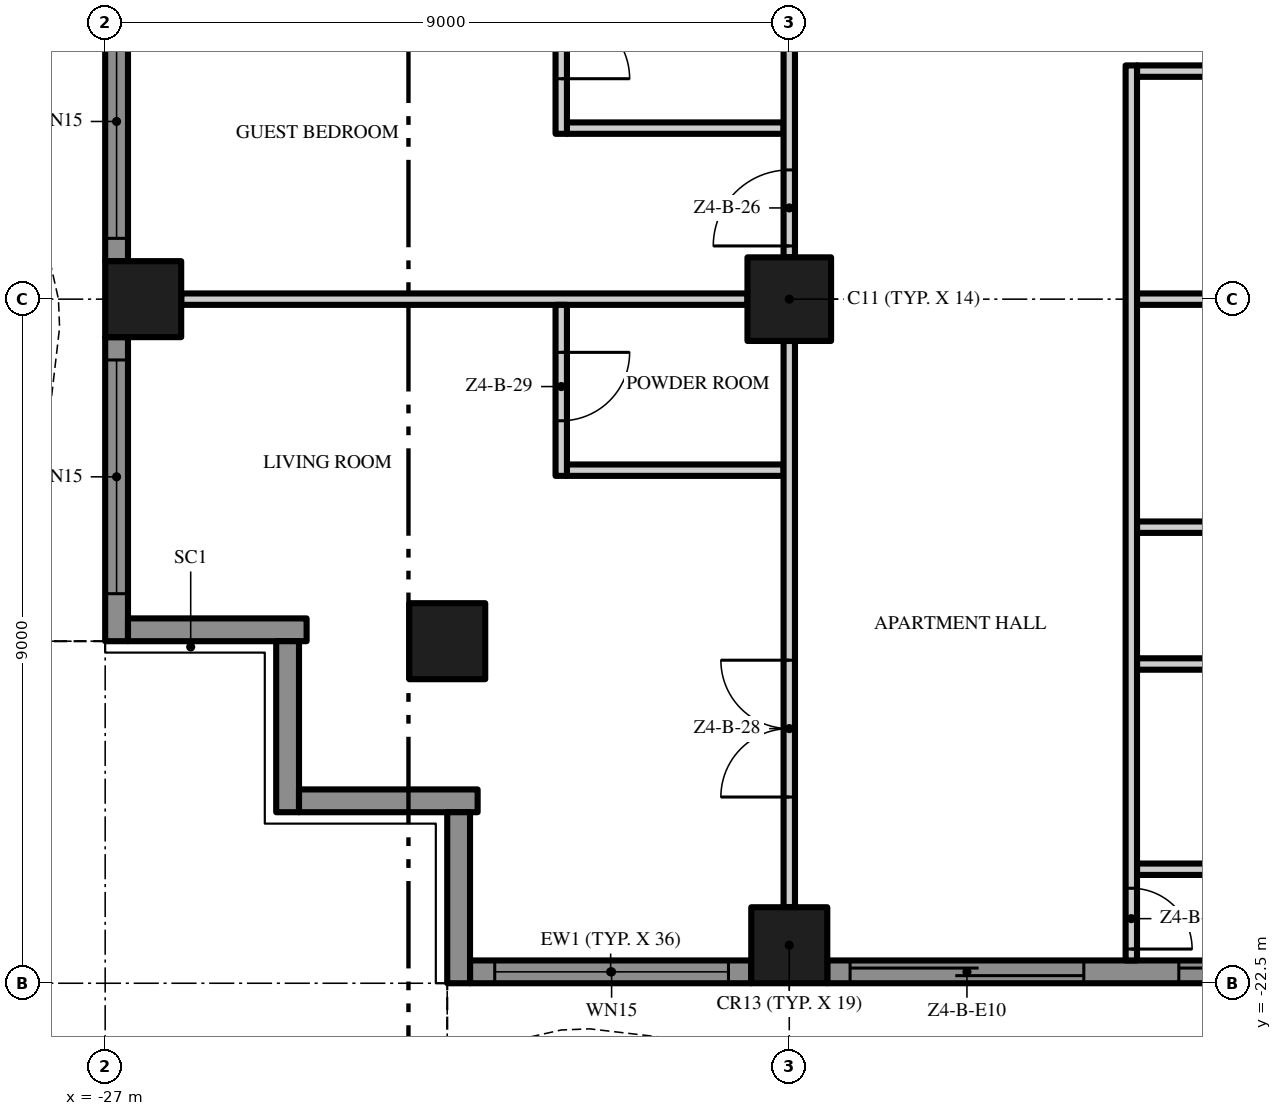
"""IFC4 building model, lengths in metres.
Left out: names, types, materials, properties, quantities, classifications, styles, units other than length and angle.
Written with IfcOpenShell. Run it as: python <this file> out.ifc"""

import sys

from ifc_helpers import new_model, si_unit, direction, frame, frame_2d, origin, origin_2d, place, context, subcontext, project, spatial, polyline, rectangle, outline, extrude, element, fill, save


model = new_model("IFC4")
c1 = context("Model", 3, precision=1e-05, world=origin(), true_north=direction((0.0, 1.0)))
c2 = subcontext(c1, "Body", "Model", "MODEL_VIEW")
j1 = project(units=[si_unit("LENGTHUNIT", "METRE"), si_unit("PLANEANGLEUNIT", "RADIAN")], contexts=[c1])
p1 = place(None, origin())
s1 = spatial("IfcSite", under=j1, at=p1, CompositionType="ELEMENT")
p2 = place(p1, origin())
s2 = spatial("IfcBuilding", under=s1, at=p2, CompositionType="ELEMENT")
p3 = place(p2, frame((0.0, 0.0, 199.6)))
s3 = spatial("IfcBuildingStorey", under=s2, at=p3, CompositionType="ELEMENT", Elevation=199.6)
p4 = place(p3, frame((-18.0, -13.5, 0.0), z_axis=(0.0, 0.0, 1.0), x_axis=(1.0, 0.0, 0.0)))
e1 = element("IfcColumn", 1, at=p4, inside=s3, PredefinedType="COLUMN", context=c2, shape_type="SweptSolid", body=[
    extrude(rectangle(XDim=1.1, YDim=1.1, at=origin_2d()), origin(), (0.0, 0.0, 1.0), 3.5),
])
for number, where, z_axis, x_axis in (
    (2, (-18.0, -22.0, 0.0), (0.0, 0.0, 1.0), (1.0, 0.0, 0.0)),
    (3, (-26.5, -13.5, 0.0), (0.0, 0.0, 1.0), (1.0, 0.0, 0.0)),
    (4, (-22.5, -18.0, 0.0), (0.0, 0.0, 1.0), (1.0, 0.0, 0.0)),
):
    element("IfcColumn", number, at=place(p3, frame(where, z_axis=z_axis, x_axis=x_axis)), inside=s3, PredefinedType="COLUMN", context=c2, shape_type="SweptSolid", body=[
        extrude(rectangle(XDim=1.0, YDim=1.0, at=origin_2d()), origin(), (0.0, 0.0, 1.0), 3.5),
    ])
p5 = place(p3, frame((-18.5, -22.35, 0.0), z_axis=(0.0, 0.0, 1.0), x_axis=(-1.0, 0.0, 0.0)))
e5 = element("IfcWall", 5, at=p5, inside=s3, PredefinedType="SOLIDWALL", context=c2, shape_type="SweptSolid", body=[
    extrude(rectangle(XDim=3.7, YDim=0.3, at=frame_2d((1.85, 0.0))), origin(), (0.0, 0.0, 1.0), 3.5),
])
p6 = place(p5, frame((0.3, 0.0, 0.45)))
e6 = element("IfcOpeningElement", 6, at=p6, cuts=e5, PredefinedType="OPENING", context=c2, shape_type="SweptSolid", body=[
    extrude(rectangle(XDim=3.075, YDim=2.65, at=frame_2d((1.538, 1.325))), frame((0.0, 0.16, 0.0), z_axis=(0.0, -1.0, 0.0), x_axis=(1.0, 0.0, 0.0)), (0.0, 0.0, 1.0), 0.32),
])
p7 = place(p3, frame((-9.5, -22.35, 0.0), z_axis=(0.0, 0.0, 1.0), x_axis=(-1.0, 0.0, 0.0)))
e7 = element("IfcWall", 7, at=p7, inside=s3, PredefinedType="SOLIDWALL", context=c2, shape_type="SweptSolid", body=[
    extrude(rectangle(XDim=8.0, YDim=0.3, at=frame_2d((4.0, 0.0))), origin(), (0.0, 0.0, 1.0), 3.5),
])
p8 = place(p7, frame((4.625, 0.0, 0.0)))
e8 = element("IfcOpeningElement", 8, at=p8, cuts=e7, PredefinedType="OPENING", context=c2, shape_type="SweptSolid", body=[
    extrude(rectangle(XDim=3.075, YDim=2.4, at=frame_2d((1.538, 1.2))), frame((0.0, 0.16, 0.0), z_axis=(0.0, -1.0, 0.0), x_axis=(1.0, 0.0, 0.0)), (0.0, 0.0, 1.0), 0.32),
])
p9 = place(p7, frame((0.3, 0.0, 0.0)))
e9 = element("IfcOpeningElement", 9, at=p9, cuts=e7, PredefinedType="OPENING", context=c2, shape_type="SweptSolid", body=[
    extrude(rectangle(XDim=3.075, YDim=2.4, at=frame_2d((1.538, 1.2))), frame((0.0, 0.16, 0.0), z_axis=(0.0, -1.0, 0.0), x_axis=(1.0, 0.0, 0.0)), (0.0, 0.0, 1.0), 0.32),
])
p10 = place(p3, frame((-26.85, -13.0, 0.0), z_axis=(0.0, 0.0, 1.0), x_axis=(0.0, 1.0, 0.0)))
e10 = element("IfcWall", 10, at=p10, inside=s3, PredefinedType="SOLIDWALL", context=c2, shape_type="SweptSolid", body=[
    extrude(rectangle(XDim=8.0, YDim=0.3, at=frame_2d((4.0, 0.0))), origin(), (0.0, 0.0, 1.0), 3.5),
])
p11 = place(p10, frame((4.625, 0.0, 0.0)))
e11 = element("IfcOpeningElement", 11, at=p11, cuts=e10, PredefinedType="OPENING", context=c2, shape_type="SweptSolid", body=[
    extrude(rectangle(XDim=3.075, YDim=2.4, at=frame_2d((1.538, 1.2))), frame((0.0, 0.16, 0.0), z_axis=(0.0, -1.0, 0.0), x_axis=(1.0, 0.0, 0.0)), (0.0, 0.0, 1.0), 0.32),
])
p12 = place(p10, frame((0.3, 0.0, 0.45)))
e12 = element("IfcOpeningElement", 12, at=p12, cuts=e10, PredefinedType="OPENING", context=c2, shape_type="SweptSolid", body=[
    extrude(rectangle(XDim=3.075, YDim=2.65, at=frame_2d((1.538, 1.325))), frame((0.0, 0.16, 0.0), z_axis=(0.0, -1.0, 0.0), x_axis=(1.0, 0.0, 0.0)), (0.0, 0.0, 1.0), 0.32),
])
p13 = place(p3, frame((-26.85, -18.0, 0.0), z_axis=(0.0, 0.0, 1.0), x_axis=(0.0, 1.0, 0.0)))
e13 = element("IfcWall", 13, at=p13, inside=s3, PredefinedType="SOLIDWALL", context=c2, shape_type="SweptSolid", body=[
    extrude(rectangle(XDim=4.0, YDim=0.3, at=frame_2d((2.0, 0.0))), origin(), (0.0, 0.0, 1.0), 3.5),
])
p14 = place(p13, frame((0.625, 0.0, 0.45)))
e14 = element("IfcOpeningElement", 14, at=p14, cuts=e13, PredefinedType="OPENING", context=c2, shape_type="SweptSolid", body=[
    extrude(rectangle(XDim=3.075, YDim=2.65, at=frame_2d((1.538, 1.325))), frame((0.0, 0.16, 0.0), z_axis=(0.0, -1.0, 0.0), x_axis=(1.0, 0.0, 0.0)), (0.0, 0.0, 1.0), 0.32),
])
p15 = place(p3, frame((-24.35, -17.85, 0.0), z_axis=(0.0, 0.0, 1.0), x_axis=(-1.0, 0.0, 0.0)))
e15 = element("IfcWall", 15, at=p15, inside=s3, PredefinedType="SOLIDWALL", context=c2, shape_type="SweptSolid", body=[
    extrude(rectangle(XDim=2.35, YDim=0.3, at=frame_2d((1.175, 0.0))), origin(), (0.0, 0.0, 1.0), 3.5),
])
p16 = place(p3, frame((-24.6, -20.25, 0.0), z_axis=(0.0, 0.0, 1.0), x_axis=(0.0, 1.0, 0.0)))
e16 = element("IfcWall", 16, at=p16, inside=s3, PredefinedType="SOLIDWALL", context=c2, shape_type="SweptSolid", body=[
    extrude(rectangle(XDim=2.25, YDim=0.3, at=frame_2d((1.125, 0.0))), origin(), (0.0, 0.0, 1.0), 3.5),
])
p17 = place(p3, frame((-22.1, -20.1, 0.0), z_axis=(0.0, 0.0, 1.0), x_axis=(-1.0, 0.0, 0.0)))
e17 = element("IfcWall", 17, at=p17, inside=s3, PredefinedType="SOLIDWALL", context=c2, shape_type="SweptSolid", body=[
    extrude(rectangle(XDim=2.35, YDim=0.3, at=frame_2d((1.175, 0.0))), origin(), (0.0, 0.0, 1.0), 3.5),
])
p18 = place(p3, frame((-22.35, -22.5, 0.0), z_axis=(0.0, 0.0, 1.0), x_axis=(0.0, 1.0, 0.0)))
e18 = element("IfcWall", 18, at=p18, inside=s3, PredefinedType="SOLIDWALL", context=c2, shape_type="SweptSolid", body=[
    extrude(rectangle(XDim=2.25, YDim=0.3, at=frame_2d((1.125, 0.0))), origin(), (0.0, 0.0, 1.0), 3.5),
])
p19 = place(p3, origin())
e19 = element("IfcWall", 19, at=p19, inside=s3, PredefinedType="USERDEFINED", context=c2, shape_type="SweptSolid", body=[
    extrude(outline(polyline([(-22.5, -23.451), (-21.0, -23.115), (-20.625, -23.1), (-19.5, -23.231), (-18.0, -23.755), (-16.5, -24.488), (-15.0, -25.149), (-13.5, -25.485), (-13.125, -25.5), (-12.0, -25.369), (-10.5, -24.845), (-9.0, -24.112), (-7.5, -23.451), (-6.0, -23.115), (-5.625, -23.1), (-4.5, -23.231), (-3.0, -23.755), (-1.5, -24.488), (0.0, -25.149), (1.5, -25.485), (1.875, -25.5), (3.0, -25.369), (4.5, -24.845), (6.0, -24.112), (7.5, -23.451), (9.0, -23.115), (9.375, -23.1), (10.5, -23.231), (12.0, -23.755), (13.5, -24.488), (15.0, -25.149), (16.5, -25.485), (16.875, -25.5), (18.0, -25.369), (19.5, -24.845), (21.0, -24.112), (22.5, -23.451), (22.399, -23.223), (20.895, -23.885), (19.404, -24.614), (17.944, -25.124), (16.865, -25.249), (16.533, -25.236), (15.079, -24.91), (13.605, -24.261), (12.096, -23.524), (10.556, -22.986), (9.385, -22.849), (8.967, -22.866), (7.421, -23.213), (5.895, -23.885), (4.404, -24.614), (2.944, -25.124), (1.865, -25.249), (1.533, -25.236), (0.079, -24.91), (-1.395, -24.261), (-2.904, -23.524), (-4.444, -22.986), (-5.615, -22.849), (-6.033, -22.866), (-7.579, -23.213), (-9.105, -23.885), (-10.596, -24.614), (-12.056, -25.124), (-13.135, -25.249), (-13.467, -25.236), (-14.921, -24.91), (-16.395, -24.261), (-17.904, -23.524), (-19.444, -22.986), (-20.615, -22.849), (-21.033, -22.866), (-22.555, -23.208), (-22.5, -23.451)])), origin(), (0.0, 0.0, 1.0), 0.9),
])
p20 = place(p3, origin())
e20 = element("IfcWall", 20, at=p20, inside=s3, PredefinedType="USERDEFINED", context=c2, shape_type="SweptSolid", body=[
    extrude(outline(polyline([(-27.951, 18.0), (-27.615, 16.5), (-27.6, 16.125), (-27.731, 15.0), (-28.255, 13.5), (-28.988, 12.0), (-29.649, 10.5), (-29.985, 9.0), (-30.0, 8.625), (-29.869, 7.5), (-29.345, 6.0), (-28.612, 4.5), (-27.951, 3.0), (-27.615, 1.5), (-27.6, 1.125), (-27.731, 0.0), (-28.255, -1.5), (-28.988, -3.0), (-29.649, -4.5), (-29.985, -6.0), (-30.0, -6.375), (-29.869, -7.5), (-29.345, -9.0), (-28.612, -10.5), (-27.951, -12.0), (-27.615, -13.5), (-27.6, -13.875), (-27.731, -15.0), (-28.255, -16.5), (-28.988, -18.0), (-28.763, -18.11), (-28.024, -16.596), (-27.486, -15.056), (-27.349, -13.885), (-27.366, -13.467), (-27.713, -11.921), (-28.385, -10.395), (-29.114, -8.904), (-29.624, -7.444), (-29.749, -6.365), (-29.736, -6.033), (-29.41, -4.579), (-28.761, -3.105), (-28.024, -1.596), (-27.486, -0.056), (-27.349, 1.115), (-27.366, 1.533), (-27.713, 3.079), (-28.385, 4.605), (-29.114, 6.096), (-29.624, 7.556), (-29.749, 8.635), (-29.736, 8.967), (-29.41, 10.421), (-28.761, 11.895), (-28.024, 13.404), (-27.486, 14.944), (-27.349, 16.115), (-27.366, 16.533), (-27.708, 18.055), (-27.951, 18.0)])), origin(), (0.0, 0.0, 1.0), 0.9),
])
for number, where, z_axis, x_axis in (
    (21, (-13.425, -21.0, 0.0), (0.0, 0.0, 1.0), (1.0, 0.0, 0.0)),
    (22, (-13.425, -18.3, 0.0), (0.0, 0.0, 1.0), (1.0, 0.0, 0.0)),
    (23, (-13.425, -16.5, 0.0), (0.0, 0.0, 1.0), (1.0, 0.0, 0.0)),
):
    element("IfcWall", number, at=place(p3, frame(where, z_axis=z_axis, x_axis=x_axis)), inside=s3, PredefinedType="PARTITIONING", context=c2, shape_type="SweptSolid", body=[
        extrude(rectangle(XDim=4.35, YDim=0.15, at=frame_2d((2.175, 0.0))), origin(), (0.0, 0.0, 1.0), 3.5),
    ])
p21 = place(p3, frame((-20.925, -15.75, 0.0), z_axis=(0.0, 0.0, 1.0), x_axis=(1.0, 0.0, 0.0)))
e24 = element("IfcWall", 24, at=p21, inside=s3, PredefinedType="PARTITIONING", context=c2, shape_type="SweptSolid", body=[
    extrude(rectangle(XDim=2.85, YDim=0.15, at=frame_2d((1.425, 0.0))), origin(), (0.0, 0.0, 1.0), 3.5),
])
p22 = place(p3, frame((-26.0, -13.5, 0.0), z_axis=(0.0, 0.0, 1.0), x_axis=(1.0, 0.0, 0.0)))
e25 = element("IfcWall", 25, at=p22, inside=s3, PredefinedType="PARTITIONING", context=c2, shape_type="SweptSolid", body=[
    extrude(rectangle(XDim=7.45, YDim=0.15, at=frame_2d((3.725, 0.0))), origin(), (0.0, 0.0, 1.0), 3.5),
])
p23 = place(p3, frame((-13.425, -13.5, 0.0), z_axis=(0.0, 0.0, 1.0), x_axis=(1.0, 0.0, 0.0)))
e26 = element("IfcWall", 26, at=p23, inside=s3, PredefinedType="PARTITIONING", context=c2, shape_type="SweptSolid", body=[
    extrude(rectangle(XDim=3.875, YDim=0.15, at=frame_2d((1.938, 0.0))), origin(), (0.0, 0.0, 1.0), 3.5),
])
p24 = place(p3, frame((-20.925, -11.25, 0.0), z_axis=(0.0, 0.0, 1.0), x_axis=(1.0, 0.0, 0.0)))
e27 = element("IfcWall", 27, at=p24, inside=s3, PredefinedType="PARTITIONING", context=c2, shape_type="SweptSolid", body=[
    extrude(rectangle(XDim=2.85, YDim=0.15, at=frame_2d((1.425, 0.0))), origin(), (0.0, 0.0, 1.0), 3.5),
])
p25 = place(p3, frame((-13.425, -10.5, 0.0), z_axis=(0.0, 0.0, 1.0), x_axis=(1.0, 0.0, 0.0)))
e28 = element("IfcWall", 28, at=p25, inside=s3, PredefinedType="PARTITIONING", context=c2, shape_type="SweptSolid", body=[
    extrude(rectangle(XDim=4.35, YDim=0.15, at=frame_2d((2.175, 0.0))), origin(), (0.0, 0.0, 1.0), 3.5),
])
p26 = place(p3, frame((-21.0, -13.575, 0.0), z_axis=(0.0, 0.0, 1.0), x_axis=(0.0, -1.0, 0.0)))
e29 = element("IfcWall", 29, at=p26, inside=s3, PredefinedType="PARTITIONING", context=c2, shape_type="SweptSolid", body=[
    extrude(rectangle(XDim=2.25, YDim=0.15, at=frame_2d((1.125, 0.0))), origin(), (0.0, 0.0, 1.0), 3.5),
])
p27 = place(p26, frame((0.625, 0.0, 0.0)))
e30 = element("IfcOpeningElement", 30, at=p27, cuts=e29, PredefinedType="OPENING", context=c2, shape_type="SweptSolid", body=[
    extrude(rectangle(XDim=0.9, YDim=2.1, at=frame_2d((0.45, 1.05))), frame((0.0, 0.085, 0.0), z_axis=(0.0, -1.0, 0.0), x_axis=(1.0, 0.0, 0.0)), (0.0, 0.0, 1.0), 0.17),
])
p28 = place(p3, frame((-21.0, -6.675, 0.0), z_axis=(0.0, 0.0, 1.0), x_axis=(0.0, -1.0, 0.0)))
e31 = element("IfcWall", 31, at=p28, inside=s3, PredefinedType="PARTITIONING", context=c2, shape_type="SweptSolid", body=[
    extrude(rectangle(XDim=4.65, YDim=0.15, at=frame_2d((2.325, 0.0))), origin(), (0.0, 0.0, 1.0), 3.5),
])
p29 = place(p28, frame((0.725, 0.0, 0.0)))
e32 = element("IfcOpeningElement", 32, at=p29, cuts=e31, PredefinedType="OPENING", context=c2, shape_type="SweptSolid", body=[
    extrude(rectangle(XDim=0.9, YDim=2.1, at=frame_2d((0.45, 1.05))), frame((0.0, 0.085, 0.0), z_axis=(0.0, -1.0, 0.0), x_axis=(1.0, 0.0, 0.0)), (0.0, 0.0, 1.0), 0.17),
])
p30 = place(p28, frame((3.025, 0.0, 0.0)))
e33 = element("IfcOpeningElement", 33, at=p30, cuts=e31, PredefinedType="OPENING", context=c2, shape_type="SweptSolid", body=[
    extrude(rectangle(XDim=0.9, YDim=2.1, at=frame_2d((0.45, 1.05))), frame((0.0, 0.085, 0.0), z_axis=(0.0, -1.0, 0.0), x_axis=(1.0, 0.0, 0.0)), (0.0, 0.0, 1.0), 0.17),
])
p31 = place(p3, frame((-18.0, -21.5, 0.0), z_axis=(0.0, 0.0, 1.0), x_axis=(0.0, 1.0, 0.0)))
e34 = element("IfcWall", 34, at=p31, inside=s3, PredefinedType="PARTITIONING", context=c2, shape_type="SweptSolid", body=[
    extrude(rectangle(XDim=7.45, YDim=0.15, at=frame_2d((3.725, 0.0))), origin(), (0.0, 0.0, 1.0), 3.5),
])
p32 = place(p31, frame((1.45, 0.0, 0.0)))
e35 = element("IfcOpeningElement", 35, at=p32, cuts=e34, PredefinedType="OPENING", context=c2, shape_type="SweptSolid", body=[
    extrude(rectangle(XDim=1.8, YDim=2.4, at=frame_2d((0.9, 1.2))), frame((0.0, 0.085, 0.0), z_axis=(0.0, -1.0, 0.0), x_axis=(1.0, 0.0, 0.0)), (0.0, 0.0, 1.0), 0.17),
])
p33 = place(p3, frame((-18.0, -12.95, 0.0), z_axis=(0.0, 0.0, 1.0), x_axis=(0.0, 1.0, 0.0)))
e36 = element("IfcWall", 36, at=p33, inside=s3, PredefinedType="PARTITIONING", context=c2, shape_type="SweptSolid", body=[
    extrude(rectangle(XDim=7.9, YDim=0.15, at=frame_2d((3.95, 0.0))), origin(), (0.0, 0.0, 1.0), 3.5),
])
p34 = place(p33, frame((6.75, 0.0, 0.0)))
e37 = element("IfcOpeningElement", 37, at=p34, cuts=e36, PredefinedType="OPENING", context=c2, shape_type="SweptSolid", body=[
    extrude(rectangle(XDim=1.0, YDim=2.4, at=frame_2d((0.5, 1.2))), frame((0.0, 0.085, 0.0), z_axis=(0.0, -1.0, 0.0), x_axis=(1.0, 0.0, 0.0)), (0.0, 0.0, 1.0), 0.17),
])
p35 = place(p33, frame((0.15, 0.0, 0.0)))
e38 = element("IfcOpeningElement", 38, at=p35, cuts=e36, PredefinedType="OPENING", context=c2, shape_type="SweptSolid", body=[
    extrude(rectangle(XDim=1.0, YDim=2.4, at=frame_2d((0.5, 1.2))), frame((0.0, 0.085, 0.0), z_axis=(0.0, -1.0, 0.0), x_axis=(1.0, 0.0, 0.0)), (0.0, 0.0, 1.0), 0.17),
])
p36 = place(p3, frame((-13.5, -10.425, 0.0), z_axis=(0.0, 0.0, 1.0), x_axis=(0.0, -1.0, 0.0)))
e39 = element("IfcWall", 39, at=p36, inside=s3, PredefinedType="PARTITIONING", context=c2, shape_type="SweptSolid", body=[
    extrude(rectangle(XDim=11.775, YDim=0.15, at=frame_2d((5.888, 0.0))), origin(), (0.0, 0.0, 1.0), 3.5),
])
p37 = place(p36, frame((10.825, 0.0, 0.0)))
e40 = element("IfcOpeningElement", 40, at=p37, cuts=e39, PredefinedType="OPENING", context=c2, shape_type="SweptSolid", body=[
    extrude(rectangle(XDim=0.8, YDim=2.0, at=frame_2d((0.4, 1.0))), frame((0.0, 0.085, 0.0), z_axis=(0.0, -1.0, 0.0), x_axis=(1.0, 0.0, 0.0)), (0.0, 0.0, 1.0), 0.17),
])
p38 = place(p6, origin())
e41 = element("IfcWindow", 41, at=p38, inside=s3, PartitioningType="SINGLE_PANEL", PredefinedType="WINDOW", context=c2, shape_type="SweptSolid", body=[
    extrude(rectangle(XDim=3.075, YDim=2.65, at=frame_2d((1.538, 1.325))), frame((0.0, 0.03, 0.0), z_axis=(0.0, -1.0, 0.0), x_axis=(1.0, 0.0, 0.0)), (0.0, 0.0, 1.0), 0.06),
])
fill(e6, e41)
p39 = place(p8, origin())
e42 = element("IfcDoor", 42, at=p39, inside=s3, OperationType="SINGLE_SWING_LEFT", PredefinedType="DOOR", context=c2, shape_type="SweptSolid", body=[
    extrude(rectangle(XDim=3.075, YDim=2.4, at=frame_2d((1.538, 1.2))), frame((0.0, 0.025, 0.0), z_axis=(0.0, -1.0, 0.0), x_axis=(1.0, 0.0, 0.0)), (0.0, 0.0, 1.0), 0.05),
])
fill(e8, e42)
p40 = place(p9, origin())
e43 = element("IfcDoor", 43, at=p40, inside=s3, OperationType="SINGLE_SWING_LEFT", PredefinedType="DOOR", context=c2, shape_type="SweptSolid", body=[
    extrude(rectangle(XDim=3.075, YDim=2.4, at=frame_2d((1.538, 1.2))), frame((0.0, 0.025, 0.0), z_axis=(0.0, -1.0, 0.0), x_axis=(1.0, 0.0, 0.0)), (0.0, 0.0, 1.0), 0.05),
])
fill(e9, e43)
p41 = place(p12, origin())
e44 = element("IfcWindow", 44, at=p41, inside=s3, PartitioningType="SINGLE_PANEL", PredefinedType="WINDOW", context=c2, shape_type="SweptSolid", body=[
    extrude(rectangle(XDim=3.075, YDim=2.65, at=frame_2d((1.538, 1.325))), frame((0.0, 0.03, 0.0), z_axis=(0.0, -1.0, 0.0), x_axis=(1.0, 0.0, 0.0)), (0.0, 0.0, 1.0), 0.06),
])
fill(e12, e44)
p42 = place(p14, origin())
e45 = element("IfcWindow", 45, at=p42, inside=s3, PartitioningType="SINGLE_PANEL", PredefinedType="WINDOW", context=c2, shape_type="SweptSolid", body=[
    extrude(rectangle(XDim=3.075, YDim=2.65, at=frame_2d((1.538, 1.325))), frame((0.0, 0.03, 0.0), z_axis=(0.0, -1.0, 0.0), x_axis=(1.0, 0.0, 0.0)), (0.0, 0.0, 1.0), 0.06),
])
fill(e14, e45)
p43 = place(p37, origin())
e46 = element("IfcDoor", 46, at=p43, inside=s3, OperationType="SINGLE_SWING_RIGHT", PredefinedType="DOOR", context=c2, shape_type="SweptSolid", body=[
    extrude(rectangle(XDim=0.8, YDim=2.0, at=frame_2d((0.4, 1.0))), frame((0.0, 0.025, 0.0), z_axis=(0.0, -1.0, 0.0), x_axis=(1.0, 0.0, 0.0)), (0.0, 0.0, 1.0), 0.05),
])
fill(e40, e46)
p44 = place(p35, origin())
e47 = element("IfcDoor", 47, at=p44, inside=s3, OperationType="SINGLE_SWING_LEFT", PredefinedType="DOOR", context=c2, shape_type="SweptSolid", body=[
    extrude(rectangle(XDim=1.0, YDim=2.4, at=frame_2d((0.5, 1.2))), frame((0.0, 0.025, 0.0), z_axis=(0.0, -1.0, 0.0), x_axis=(1.0, 0.0, 0.0)), (0.0, 0.0, 1.0), 0.05),
])
fill(e38, e47)
p45 = place(p30, origin())
e48 = element("IfcDoor", 48, at=p45, inside=s3, OperationType="SINGLE_SWING_RIGHT", PredefinedType="DOOR", context=c2, shape_type="SweptSolid", body=[
    extrude(rectangle(XDim=0.9, YDim=2.1, at=frame_2d((0.45, 1.05))), frame((0.0, 0.025, 0.0), z_axis=(0.0, -1.0, 0.0), x_axis=(1.0, 0.0, 0.0)), (0.0, 0.0, 1.0), 0.05),
])
fill(e33, e48)
p46 = place(p32, origin())
e49 = element("IfcDoor", 49, at=p46, inside=s3, OperationType="DOUBLE_DOOR_SINGLE_SWING", PredefinedType="DOOR", context=c2, shape_type="SweptSolid", body=[
    extrude(rectangle(XDim=1.8, YDim=2.4, at=frame_2d((0.9, 1.2))), frame((0.0, 0.025, 0.0), z_axis=(0.0, -1.0, 0.0), x_axis=(1.0, 0.0, 0.0)), (0.0, 0.0, 1.0), 0.05),
])
fill(e35, e49)
p47 = place(p27, origin())
e50 = element("IfcDoor", 50, at=p47, inside=s3, OperationType="SINGLE_SWING_LEFT", PredefinedType="DOOR", context=c2, shape_type="SweptSolid", body=[
    extrude(rectangle(XDim=0.9, YDim=2.1, at=frame_2d((0.45, 1.05))), frame((0.0, 0.025, 0.0), z_axis=(0.0, -1.0, 0.0), x_axis=(1.0, 0.0, 0.0)), (0.0, 0.0, 1.0), 0.05),
])
fill(e30, e50)
save(model, sys.argv[1])
